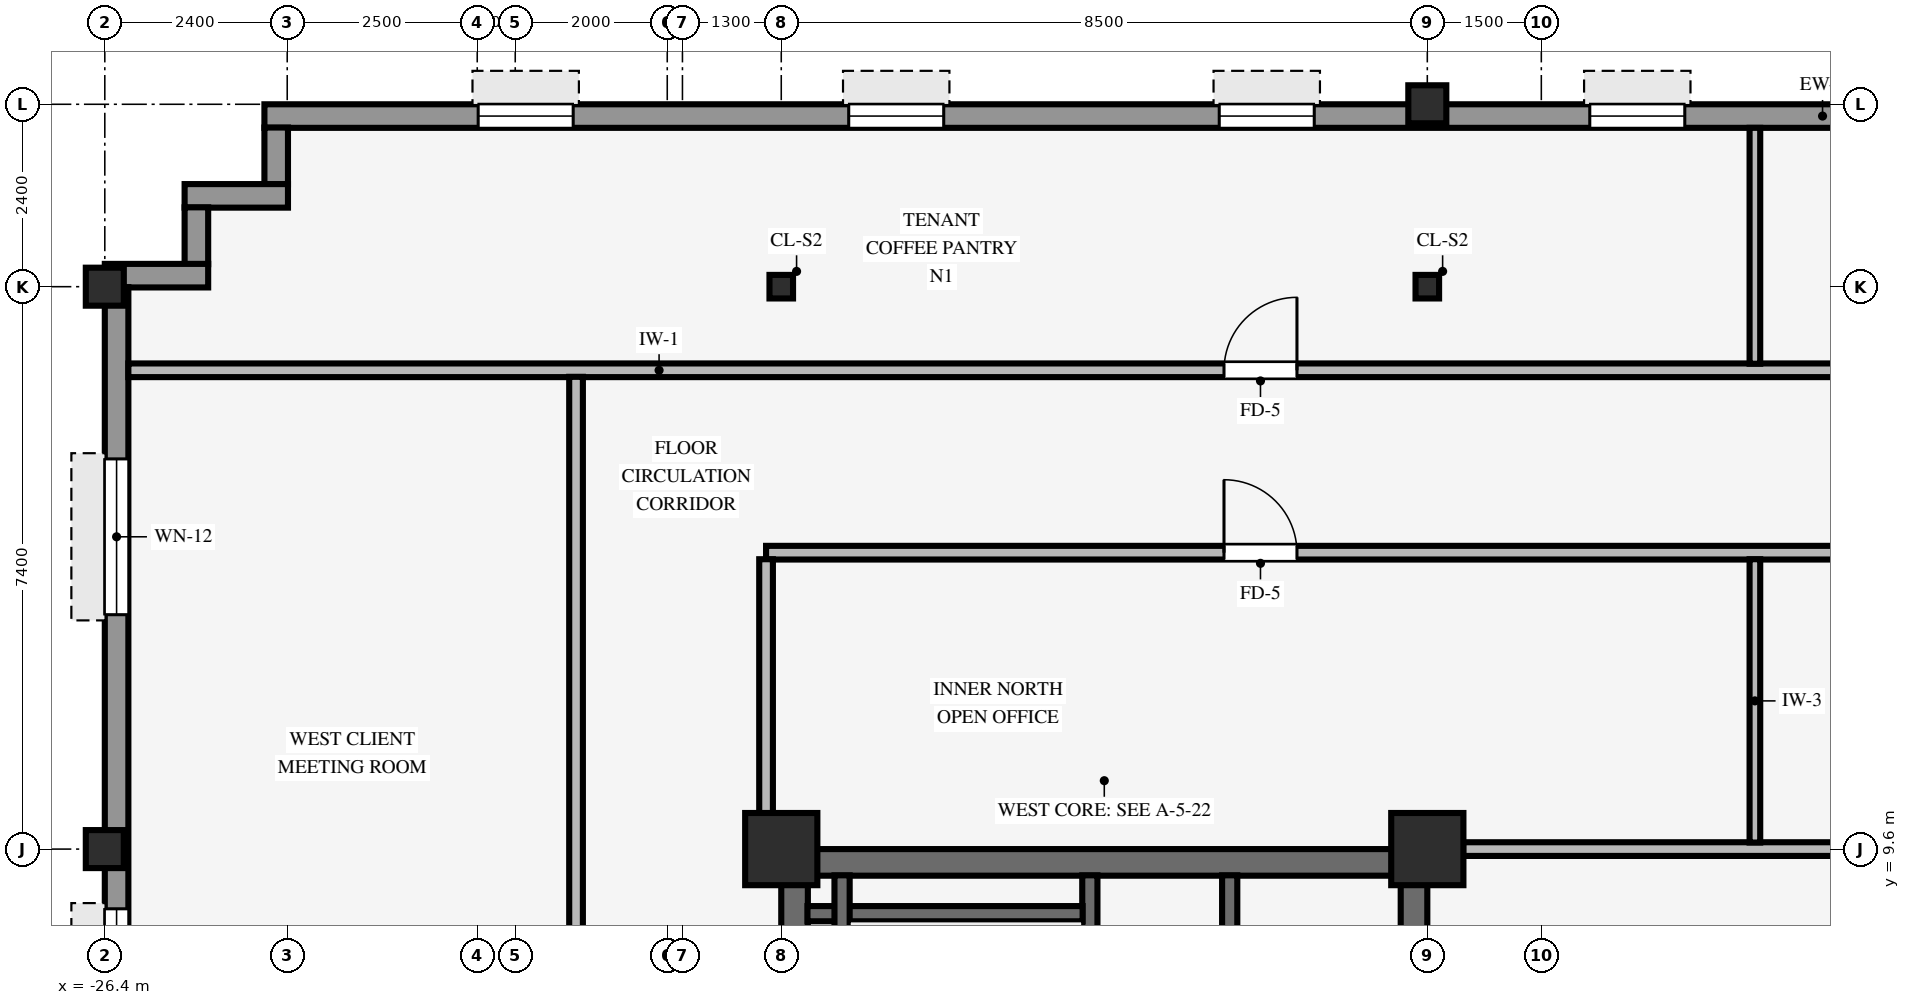
"""IFC4 building model, lengths in metres.
Left out: names, types, materials, properties, quantities, classifications, styles, units other than length and angle.
Written with IfcOpenShell. Run it as: python <this file> out.ifc"""

import sys

from ifc_helpers import new_model, si_unit, direction, frame, frame_2d, origin, origin_2d, place, context, subcontext, project, spatial, rectangle, hollow_rectangle, i_section, extrude, source, transform, mapped, element, fill, save


model = new_model("IFC4")
c1 = context("Model", 3, precision=1e-05, world=origin(), true_north=direction((0.0, 1.0)))
c2 = subcontext(c1, "Body", "Model", "MODEL_VIEW")
j1 = project(units=[si_unit("LENGTHUNIT", "METRE"), si_unit("PLANEANGLEUNIT", "RADIAN")], contexts=[c1])
p1 = place(None, origin())
s1 = spatial("IfcSite", under=j1, at=p1, CompositionType="ELEMENT")
p2 = place(p1, origin())
s2 = spatial("IfcBuilding", under=s1, at=p2, CompositionType="ELEMENT")
p3 = place(p2, frame((0.0, 0.0, 212.8)))
s3 = spatial("IfcBuildingStorey", under=s2, at=p3, CompositionType="ELEMENT", Elevation=212.8)
p4 = place(p3, frame((-17.5, 9.425, 0.0), z_axis=(0.0, 0.0, 1.0), x_axis=(1.0, 0.0, 0.0)))
e1 = element("IfcWall", 1, at=p4, inside=s3, PredefinedType="SHEAR", context=c2, shape_type="SweptSolid", body=[
    extrude(rectangle(XDim=8.5, YDim=0.35, at=frame_2d((4.25, 0.0))), origin(), (0.0, 0.0, 1.0), 3.37),
])
p5 = place(p3, frame((-17.325, -9.255, 0.0), z_axis=(0.0, 0.0, 1.0), x_axis=(0.0, 1.0, 0.0)))
e2 = element("IfcWall", 2, at=p5, inside=s3, PredefinedType="SHEAR", context=c2, shape_type="SweptSolid", body=[
    extrude(rectangle(XDim=18.51, YDim=0.35, at=frame_2d((9.255, 0.0))), origin(), (0.0, 0.0, 1.0), 3.37),
])
p6 = place(p3, frame((-9.175, -9.255, 0.0), z_axis=(0.0, 0.0, 1.0), x_axis=(0.0, 1.0, 0.0)))
e3 = element("IfcWall", 3, at=p6, inside=s3, PredefinedType="SHEAR", context=c2, shape_type="SweptSolid", body=[
    extrude(rectangle(XDim=18.51, YDim=0.35, at=frame_2d((9.255, 0.0))), origin(), (0.0, 0.0, 1.0), 3.37),
])
p7 = place(p6, frame((8.655, 0.0, 0.0)))
e4 = element("IfcOpeningElement", 4, at=p7, cuts=e3, PredefinedType="OPENING", context=c2, shape_type="SweptSolid", body=[
    extrude(rectangle(XDim=1.2, YDim=2.15, at=frame_2d((0.6, 1.075))), frame((0.0, 0.185, 0.0), z_axis=(0.0, -1.0, 0.0), x_axis=(1.0, 0.0, 0.0)), (0.0, 0.0, 1.0), 0.37),
])
for number, where, z_axis, x_axis in (
    (5, (-17.5, 9.6, 0.0), (0.0, 0.0, 1.0), (1.0, 0.0, 0.0)),
    (6, (-9.0, 9.6, 0.0), (0.0, 0.0, 1.0), (1.0, 0.0, 0.0)),
):
    element("IfcColumn", number, at=place(p3, frame(where, z_axis=z_axis, x_axis=x_axis)), inside=s3, PredefinedType="COLUMN", context=c2, shape_type="SweptSolid", body=[
        extrude(rectangle(XDim=0.95, YDim=0.95, at=origin_2d()), origin(), (0.0, 0.0, 1.0), 3.37),
    ])
for number, where, z_axis, x_axis in (
    (7, (-26.4, 9.6, 0.0), (0.0, 0.0, 1.0), (1.0, 0.0, 0.0)),
    (8, (-26.4, 17.0, 0.0), (0.0, 0.0, 1.0), (1.0, 0.0, 0.0)),
    (9, (-9.0, 19.4, 0.0), (0.0, 0.0, 1.0), (1.0, 0.0, 0.0)),
):
    element("IfcColumn", number, at=place(p3, frame(where, z_axis=z_axis, x_axis=x_axis)), inside=s3, PredefinedType="COLUMN", context=c2, shape_type="SweptSolid", body=[
        extrude(hollow_rectangle(XDim=0.5, YDim=0.5, WallThickness=0.032, InnerFilletRadius=0.032, OuterFilletRadius=0.064, at=origin_2d()), origin(), (0.0, 0.0, 1.0), 3.37),
    ])
for number, where, z_axis, x_axis in (
    (10, (-17.5, 17.0, 0.0), (0.0, 0.0, 1.0), (1.0, 0.0, 0.0)),
    (11, (-9.0, 17.0, 0.0), (0.0, 0.0, 1.0), (1.0, 0.0, 0.0)),
):
    element("IfcColumn", number, at=place(p3, frame(where, z_axis=z_axis, x_axis=x_axis)), inside=s3, PredefinedType="COLUMN", context=c2, shape_type="SweptSolid", body=[
        extrude(i_section(OverallWidth=0.31, OverallDepth=0.31, WebThickness=0.015, FlangeThickness=0.015, FilletRadius=0.015, at=origin_2d()), origin(), (0.0, 0.0, 1.0), 3.37),
    ])
p8 = place(p3, frame((-24.3, 19.245, 0.0), z_axis=(0.0, 0.0, 1.0), x_axis=(1.0, 0.0, 0.0)))
e12 = element("IfcWall", 12, at=p8, inside=s3, PredefinedType="STANDARD", context=c2, shape_type="SweptSolid", body=[
    extrude(rectangle(XDim=41.0, YDim=0.31, at=frame_2d((20.5, 0.0))), origin(), (0.0, 0.0, 1.0), 2.705),
])
p9 = place(p8, frame((2.812, 0.0, 0.8)))
e13 = element("IfcOpeningElement", 13, at=p9, cuts=e12, PredefinedType="OPENING", context=c2, shape_type="SweptSolid", body=[
    extrude(rectangle(XDim=1.25, YDim=1.52, at=frame_2d((0.625, 0.76))), frame((0.0, 0.165, 0.0), z_axis=(0.0, -1.0, 0.0), x_axis=(1.0, 0.0, 0.0)), (0.0, 0.0, 1.0), 0.33),
])
p10 = place(p8, frame((7.688, 0.0, 0.8)))
e14 = element("IfcOpeningElement", 14, at=p10, cuts=e12, PredefinedType="OPENING", context=c2, shape_type="SweptSolid", body=[
    extrude(rectangle(XDim=1.25, YDim=1.52, at=frame_2d((0.625, 0.76))), frame((0.0, 0.165, 0.0), z_axis=(0.0, -1.0, 0.0), x_axis=(1.0, 0.0, 0.0)), (0.0, 0.0, 1.0), 0.33),
])
p11 = place(p8, frame((12.562, 0.0, 0.8)))
e15 = element("IfcOpeningElement", 15, at=p11, cuts=e12, PredefinedType="OPENING", context=c2, shape_type="SweptSolid", body=[
    extrude(rectangle(XDim=1.25, YDim=1.52, at=frame_2d((0.625, 0.76))), frame((0.0, 0.165, 0.0), z_axis=(0.0, -1.0, 0.0), x_axis=(1.0, 0.0, 0.0)), (0.0, 0.0, 1.0), 0.33),
])
p12 = place(p8, frame((17.438, 0.0, 0.8)))
e16 = element("IfcOpeningElement", 16, at=p12, cuts=e12, PredefinedType="OPENING", context=c2, shape_type="SweptSolid", body=[
    extrude(rectangle(XDim=1.25, YDim=1.52, at=frame_2d((0.625, 0.76))), frame((0.0, 0.165, 0.0), z_axis=(0.0, -1.0, 0.0), x_axis=(1.0, 0.0, 0.0)), (0.0, 0.0, 1.0), 0.33),
])
p13 = place(p8, frame((22.312, 0.0, 0.8)))
e17 = element("IfcOpeningElement", 17, at=p13, cuts=e12, PredefinedType="OPENING", context=c2, shape_type="SweptSolid", body=[
    extrude(rectangle(XDim=1.25, YDim=1.52, at=frame_2d((0.625, 0.76))), frame((0.0, 0.165, 0.0), z_axis=(0.0, -1.0, 0.0), x_axis=(1.0, 0.0, 0.0)), (0.0, 0.0, 1.0), 0.33),
])
p14 = place(p8, frame((27.188, 0.0, 0.8)))
e18 = element("IfcOpeningElement", 18, at=p14, cuts=e12, PredefinedType="OPENING", context=c2, shape_type="SweptSolid", body=[
    extrude(rectangle(XDim=1.25, YDim=1.52, at=frame_2d((0.625, 0.76))), frame((0.0, 0.165, 0.0), z_axis=(0.0, -1.0, 0.0), x_axis=(1.0, 0.0, 0.0)), (0.0, 0.0, 1.0), 0.33),
])
p15 = place(p8, frame((31.163, 0.0, 0.8)))
e19 = element("IfcOpeningElement", 19, at=p15, cuts=e12, PredefinedType="OPENING", context=c2, shape_type="SweptSolid", body=[
    extrude(rectangle(XDim=1.25, YDim=1.52, at=frame_2d((0.625, 0.76))), frame((0.0, 0.165, 0.0), z_axis=(0.0, -1.0, 0.0), x_axis=(1.0, 0.0, 0.0)), (0.0, 0.0, 1.0), 0.33),
])
p16 = place(p8, frame((36.938, 0.0, 0.8)))
e20 = element("IfcOpeningElement", 20, at=p16, cuts=e12, PredefinedType="OPENING", context=c2, shape_type="SweptSolid", body=[
    extrude(rectangle(XDim=1.25, YDim=1.52, at=frame_2d((0.625, 0.76))), frame((0.0, 0.165, 0.0), z_axis=(0.0, -1.0, 0.0), x_axis=(1.0, 0.0, 0.0)), (0.0, 0.0, 1.0), 0.33),
])
p17 = place(p3, frame((-24.145, 18.346, 0.0), z_axis=(0.0, 0.0, 1.0), x_axis=(0.0, 1.0, 0.0)))
e21 = element("IfcWall", 21, at=p17, inside=s3, PredefinedType="STANDARD", context=c2, shape_type="SweptSolid", body=[
    extrude(rectangle(XDim=0.748, YDim=0.31, at=frame_2d((0.374, 0.0))), origin(), (0.0, 0.0, 1.0), 2.816),
])
p18 = place(p3, frame((-25.35, 18.195, 0.0), z_axis=(0.0, 0.0, 1.0), x_axis=(1.0, 0.0, 0.0)))
e22 = element("IfcWall", 22, at=p18, inside=s3, PredefinedType="STANDARD", context=c2, shape_type="SweptSolid", body=[
    extrude(rectangle(XDim=1.36, YDim=0.31, at=frame_2d((0.68, 0.0))), origin(), (0.0, 0.0, 1.0), 2.816),
])
p19 = place(p3, frame((-25.195, 17.296, 0.0), z_axis=(0.0, 0.0, 1.0), x_axis=(0.0, 1.0, 0.0)))
e23 = element("IfcWall", 23, at=p19, inside=s3, PredefinedType="STANDARD", context=c2, shape_type="SweptSolid", body=[
    extrude(rectangle(XDim=0.748, YDim=0.31, at=frame_2d((0.374, 0.0))), origin(), (0.0, 0.0, 1.0), 2.816),
])
p20 = place(p3, frame((-26.4, 17.145, 0.0), z_axis=(0.0, 0.0, 1.0), x_axis=(1.0, 0.0, 0.0)))
e24 = element("IfcWall", 24, at=p20, inside=s3, PredefinedType="STANDARD", context=c2, shape_type="SweptSolid", body=[
    extrude(rectangle(XDim=1.36, YDim=0.31, at=frame_2d((0.68, 0.0))), origin(), (0.0, 0.0, 1.0), 2.816),
])
p21 = place(p3, frame((-26.245, -16.994, 0.0), z_axis=(0.0, 0.0, 1.0), x_axis=(0.0, 1.0, 0.0)))
e25 = element("IfcWall", 25, at=p21, inside=s3, PredefinedType="STANDARD", context=c2, shape_type="SweptSolid", body=[
    extrude(rectangle(XDim=33.988, YDim=0.31, at=frame_2d((16.994, 0.0))), origin(), (0.0, 0.0, 1.0), 2.705),
])
p22 = place(p21, frame((2.26, 0.0, 0.8)))
e26 = element("IfcOpeningElement", 26, at=p22, cuts=e25, PredefinedType="OPENING", context=c2, shape_type="SweptSolid", body=[
    extrude(rectangle(XDim=2.05, YDim=1.52, at=frame_2d((1.025, 0.76))), frame((0.0, 0.165, 0.0), z_axis=(0.0, -1.0, 0.0), x_axis=(1.0, 0.0, 0.0)), (0.0, 0.0, 1.0), 0.33),
])
p23 = place(p21, frame((8.18, 0.0, 0.8)))
e27 = element("IfcOpeningElement", 27, at=p23, cuts=e25, PredefinedType="OPENING", context=c2, shape_type="SweptSolid", body=[
    extrude(rectangle(XDim=2.05, YDim=1.52, at=frame_2d((1.025, 0.76))), frame((0.0, 0.165, 0.0), z_axis=(0.0, -1.0, 0.0), x_axis=(1.0, 0.0, 0.0)), (0.0, 0.0, 1.0), 0.33),
])
p24 = place(p21, frame((10.949, 0.0, 0.8)))
e28 = element("IfcOpeningElement", 28, at=p24, cuts=e25, PredefinedType="OPENING", context=c2, shape_type="SweptSolid", body=[
    extrude(rectangle(XDim=2.05, YDim=1.52, at=frame_2d((1.025, 0.76))), frame((0.0, 0.165, 0.0), z_axis=(0.0, -1.0, 0.0), x_axis=(1.0, 0.0, 0.0)), (0.0, 0.0, 1.0), 0.33),
])
p25 = place(p21, frame((20.539, 0.0, 0.8)))
e29 = element("IfcOpeningElement", 29, at=p25, cuts=e25, PredefinedType="OPENING", context=c2, shape_type="SweptSolid", body=[
    extrude(rectangle(XDim=2.05, YDim=1.52, at=frame_2d((1.025, 0.76))), frame((0.0, 0.165, 0.0), z_axis=(0.0, -1.0, 0.0), x_axis=(1.0, 0.0, 0.0)), (0.0, 0.0, 1.0), 0.33),
])
p26 = place(p21, frame((23.758, 0.0, 0.8)))
e30 = element("IfcOpeningElement", 30, at=p26, cuts=e25, PredefinedType="OPENING", context=c2, shape_type="SweptSolid", body=[
    extrude(rectangle(XDim=2.05, YDim=1.52, at=frame_2d((1.025, 0.76))), frame((0.0, 0.165, 0.0), z_axis=(0.0, -1.0, 0.0), x_axis=(1.0, 0.0, 0.0)), (0.0, 0.0, 1.0), 0.33),
])
p27 = place(p21, frame((29.678, 0.0, 0.8)))
e31 = element("IfcOpeningElement", 31, at=p27, cuts=e25, PredefinedType="OPENING", context=c2, shape_type="SweptSolid", body=[
    extrude(rectangle(XDim=2.05, YDim=1.52, at=frame_2d((1.025, 0.76))), frame((0.0, 0.165, 0.0), z_axis=(0.0, -1.0, 0.0), x_axis=(1.0, 0.0, 0.0)), (0.0, 0.0, 1.0), 0.33),
])
p28 = place(p3, frame((-13.44, 0.9, 0.0), z_axis=(0.0, 0.0, 1.0), x_axis=(0.0, 1.0, 0.0)))
e32 = element("IfcWall", 32, at=p28, inside=s3, PredefinedType="SHEAR", context=c2, shape_type="SweptSolid", body=[
    extrude(rectangle(XDim=8.355, YDim=0.2, at=frame_2d((4.177, 0.0))), origin(), (0.0, 0.0, 1.0), 3.37),
])
p29 = place(p28, frame((1.53, 0.0, 0.0), z_axis=(0.0, 0.0, 1.0), x_axis=(-1.0, 0.0, 0.0)))
e33 = element("IfcOpeningElement", 33, at=p29, cuts=e32, PredefinedType="OPENING", context=c2, shape_type="SweptSolid", body=[
    extrude(rectangle(XDim=1.1, YDim=2.15, at=frame_2d((0.55, 1.075))), frame((0.0, 0.11, 0.0), z_axis=(0.0, -1.0, 0.0), x_axis=(1.0, 0.0, 0.0)), (0.0, 0.0, 1.0), 0.22),
])
p30 = place(p3, frame((-17.155, 8.75, 0.0), z_axis=(0.0, 0.0, 1.0), x_axis=(1.0, 0.0, 0.0)))
e34 = element("IfcWall", 34, at=p30, inside=s3, PredefinedType="SHEAR", context=c2, shape_type="SweptSolid", body=[
    extrude(rectangle(XDim=3.62, YDim=0.2, at=frame_2d((1.81, 0.0))), origin(), (0.0, 0.0, 1.0), 3.37),
])
p31 = place(p3, frame((-16.7, 1.095, 0.0), z_axis=(0.0, 0.0, 1.0), x_axis=(0.0, 1.0, 0.0)))
e35 = element("IfcWall", 35, at=p31, inside=s3, PredefinedType="SHEAR", context=c2, shape_type="SweptSolid", body=[
    extrude(rectangle(XDim=8.16, YDim=0.2, at=frame_2d((4.08, 0.0))), origin(), (0.0, 0.0, 1.0), 3.37),
])
p32 = place(p3, frame((-11.6, 1.3, 0.0), z_axis=(0.0, 0.0, 1.0), x_axis=(0.0, 1.0, 0.0)))
e36 = element("IfcWall", 36, at=p32, inside=s3, PredefinedType="SHEAR", context=c2, shape_type="SweptSolid", body=[
    extrude(rectangle(XDim=7.955, YDim=0.2, at=frame_2d((3.978, 0.0))), origin(), (0.0, 0.0, 1.0), 3.37),
])
p33 = place(p3, frame((-8.529, 9.6, 0.0), z_axis=(0.0, 0.0, 1.0), x_axis=(1.0, 0.0, 0.0)))
e37 = element("IfcWall", 37, at=p33, inside=s3, PredefinedType="PARTITIONING", context=c2, shape_type="SweptSolid", body=[
    extrude(rectangle(XDim=8.378, YDim=0.18, at=frame_2d((4.189, 0.0))), origin(), (0.0, 0.0, 1.0), 2.405),
])
p34 = place(p3, frame((-17.7, 13.5, 0.0), z_axis=(0.0, 0.0, 1.0), x_axis=(1.0, 0.0, 0.0)))
e38 = element("IfcWall", 38, at=p34, inside=s3, PredefinedType="PARTITIONING", context=c2, shape_type="SweptSolid", body=[
    extrude(rectangle(XDim=24.3, YDim=0.18, at=frame_2d((12.15, 0.0))), origin(), (0.0, 0.0, 1.0), 3.008),
])
p35 = place(p34, frame((6.025, 0.0, 0.0)))
e39 = element("IfcOpeningElement", 39, at=p35, cuts=e38, PredefinedType="OPENING", context=c2, shape_type="SweptSolid", body=[
    extrude(rectangle(XDim=0.96, YDim=2.1, at=frame_2d((0.48, 1.05))), frame((0.0, 0.1, 0.0), z_axis=(0.0, -1.0, 0.0), x_axis=(1.0, 0.0, 0.0)), (0.0, 0.0, 1.0), 0.2),
])
p36 = place(p34, frame((18.175, 0.0, 0.0)))
e40 = element("IfcOpeningElement", 40, at=p36, cuts=e38, PredefinedType="OPENING", context=c2, shape_type="SweptSolid", body=[
    extrude(rectangle(XDim=0.96, YDim=2.1, at=frame_2d((0.48, 1.05))), frame((0.0, 0.1, 0.0), z_axis=(0.0, -1.0, 0.0), x_axis=(1.0, 0.0, 0.0)), (0.0, 0.0, 1.0), 0.2),
])
p37 = place(p3, frame((-26.09, 15.9, 0.0), z_axis=(0.0, 0.0, 1.0), x_axis=(1.0, 0.0, 0.0)))
e41 = element("IfcWall", 41, at=p37, inside=s3, PredefinedType="PARTITIONING", context=c2, shape_type="SweptSolid", body=[
    extrude(rectangle(XDim=35.09, YDim=0.18, at=frame_2d((17.545, 0.0))), origin(), (0.0, 0.0, 1.0), 3.36),
])
p38 = place(p37, frame((14.415, 0.0, 0.0)))
e42 = element("IfcOpeningElement", 42, at=p38, cuts=e41, PredefinedType="OPENING", context=c2, shape_type="SweptSolid", body=[
    extrude(rectangle(XDim=0.96, YDim=2.1, at=frame_2d((0.48, 1.05))), frame((0.0, 0.1, 0.0), z_axis=(0.0, -1.0, 0.0), x_axis=(1.0, 0.0, 0.0)), (0.0, 0.0, 1.0), 0.2),
])
p39 = place(p37, frame((26.565, 0.0, 0.0)))
e43 = element("IfcOpeningElement", 43, at=p39, cuts=e41, PredefinedType="OPENING", context=c2, shape_type="SweptSolid", body=[
    extrude(rectangle(XDim=0.96, YDim=2.1, at=frame_2d((0.48, 1.05))), frame((0.0, 0.1, 0.0), z_axis=(0.0, -1.0, 0.0), x_axis=(1.0, 0.0, 0.0)), (0.0, 0.0, 1.0), 0.2),
])
p40 = place(p3, frame((-20.2, -15.814, 0.0), z_axis=(0.0, 0.0, 1.0), x_axis=(0.0, 1.0, 0.0)))
e44 = element("IfcWall", 44, at=p40, inside=s3, PredefinedType="PARTITIONING", context=c2, shape_type="SweptSolid", body=[
    extrude(rectangle(XDim=31.628, YDim=0.18, at=frame_2d((15.814, 0.0))), origin(), (0.0, 0.0, 1.0), 3.36),
])
p41 = place(p40, frame((20.334, 0.0, 0.0)))
e45 = element("IfcOpeningElement", 45, at=p41, cuts=e44, PredefinedType="OPENING", context=c2, shape_type="SweptSolid", body=[
    extrude(rectangle(XDim=0.96, YDim=2.1, at=frame_2d((0.48, 1.05))), frame((0.0, 0.1, 0.0), z_axis=(0.0, -1.0, 0.0), x_axis=(1.0, 0.0, 0.0)), (0.0, 0.0, 1.0), 0.2),
])
p42 = place(p40, frame((6.834, 0.0, 0.0)))
e46 = element("IfcOpeningElement", 46, at=p42, cuts=e44, PredefinedType="OPENING", context=c2, shape_type="SweptSolid", body=[
    extrude(rectangle(XDim=0.96, YDim=2.1, at=frame_2d((0.48, 1.05))), frame((0.0, 0.1, 0.0), z_axis=(0.0, -1.0, 0.0), x_axis=(1.0, 0.0, 0.0)), (0.0, 0.0, 1.0), 0.2),
])
p43 = place(p3, frame((-17.7, 10.071, 0.0), z_axis=(0.0, 0.0, 1.0), x_axis=(0.0, 1.0, 0.0)))
e47 = element("IfcWall", 47, at=p43, inside=s3, PredefinedType="PARTITIONING", context=c2, shape_type="SweptSolid", body=[
    extrude(rectangle(XDim=3.343, YDim=0.18, at=frame_2d((1.671, 0.0))), origin(), (0.0, 0.0, 1.0), 2.816),
])
p44 = place(p3, frame((-4.69, 9.686, 0.0), z_axis=(0.0, 0.0, 1.0), x_axis=(0.0, 1.0, 0.0)))
e48 = element("IfcWall", 48, at=p44, inside=s3, PredefinedType="PARTITIONING", context=c2, shape_type="SweptSolid", body=[
    extrude(rectangle(XDim=3.728, YDim=0.14, at=frame_2d((1.864, 0.0))), origin(), (0.0, 0.0, 1.0), 3.36),
])
p45 = place(p3, frame((-4.69, 15.986, 0.0), z_axis=(0.0, 0.0, 1.0), x_axis=(0.0, 1.0, 0.0)))
e49 = element("IfcWall", 49, at=p45, inside=s3, PredefinedType="PARTITIONING", context=c2, shape_type="SweptSolid", body=[
    extrude(rectangle(XDim=3.104, YDim=0.14, at=frame_2d((1.552, 0.0))), origin(), (0.0, 0.0, 1.0), 3.36),
])
m1 = source(origin(), c2, "Body", "SweptSolid", [
    extrude(rectangle(XDim=1.25, YDim=1.52, at=frame_2d((0.625, 0.76))), frame((0.0, 0.03, 0.0), z_axis=(0.0, -1.0, 0.0), x_axis=(1.0, 0.0, 0.0)), (0.0, 0.0, 1.0), 0.06),
])
p46 = place(p9, origin())
e50 = element("IfcWindow", 50, at=p46, inside=s3, PartitioningType="SINGLE_PANEL", PredefinedType="WINDOW", context=c2, shape_type="MappedRepresentation", body=[
    mapped(m1, transform((0.0, 0.0, 0.0), scale=1.0)),
])
fill(e13, e50)
p47 = place(p10, origin())
e51 = element("IfcWindow", 51, at=p47, inside=s3, PartitioningType="SINGLE_PANEL", PredefinedType="WINDOW", context=c2, shape_type="MappedRepresentation", body=[
    mapped(m1, transform((0.0, 0.0, 0.0), scale=1.0)),
])
fill(e14, e51)
p48 = place(p11, origin())
e52 = element("IfcWindow", 52, at=p48, inside=s3, PartitioningType="SINGLE_PANEL", PredefinedType="WINDOW", context=c2, shape_type="MappedRepresentation", body=[
    mapped(m1, transform((0.0, 0.0, 0.0), scale=1.0)),
])
fill(e15, e52)
p49 = place(p12, origin())
e53 = element("IfcWindow", 53, at=p49, inside=s3, PartitioningType="SINGLE_PANEL", PredefinedType="WINDOW", context=c2, shape_type="MappedRepresentation", body=[
    mapped(m1, transform((0.0, 0.0, 0.0), scale=1.0)),
])
fill(e16, e53)
m2 = source(origin(), c2, "Body", "SweptSolid", [
    extrude(rectangle(XDim=2.05, YDim=1.52, at=frame_2d((1.025, 0.76))), frame((0.0, 0.03, 0.0), z_axis=(0.0, -1.0, 0.0), x_axis=(1.0, 0.0, 0.0)), (0.0, 0.0, 1.0), 0.06),
])
p50 = place(p26, origin())
e54 = element("IfcWindow", 54, at=p50, inside=s3, PartitioningType="SINGLE_PANEL", PredefinedType="WINDOW", context=c2, shape_type="MappedRepresentation", body=[
    mapped(m2, transform((0.0, 0.0, 0.0), scale=1.0)),
])
fill(e30, e54)
p51 = place(p27, origin())
e55 = element("IfcWindow", 55, at=p51, inside=s3, PartitioningType="SINGLE_PANEL", PredefinedType="WINDOW", context=c2, shape_type="MappedRepresentation", body=[
    mapped(m2, transform((0.0, 0.0, 0.0), scale=1.0)),
])
fill(e31, e55)
m3 = source(origin(), c2, "Body", "SweptSolid", [
    extrude(rectangle(XDim=0.96, YDim=2.1, at=frame_2d((0.48, 1.05))), frame((0.0, 0.025, 0.0), z_axis=(0.0, -1.0, 0.0), x_axis=(1.0, 0.0, 0.0)), (0.0, 0.0, 1.0), 0.05),
])
p52 = place(p38, origin())
e56 = element("IfcDoor", 56, at=p52, inside=s3, OperationType="SINGLE_SWING_RIGHT", PredefinedType="DOOR", context=c2, shape_type="MappedRepresentation", body=[
    mapped(m3, transform((0.0, 0.0, 0.0), scale=1.0)),
])
fill(e42, e56)
p53 = place(p35, origin())
e57 = element("IfcDoor", 57, at=p53, inside=s3, OperationType="SINGLE_SWING_LEFT", PredefinedType="DOOR", context=c2, shape_type="MappedRepresentation", body=[
    mapped(m3, transform((0.0, 0.0, 0.0), scale=1.0)),
])
fill(e39, e57)
save(model, sys.argv[1])
